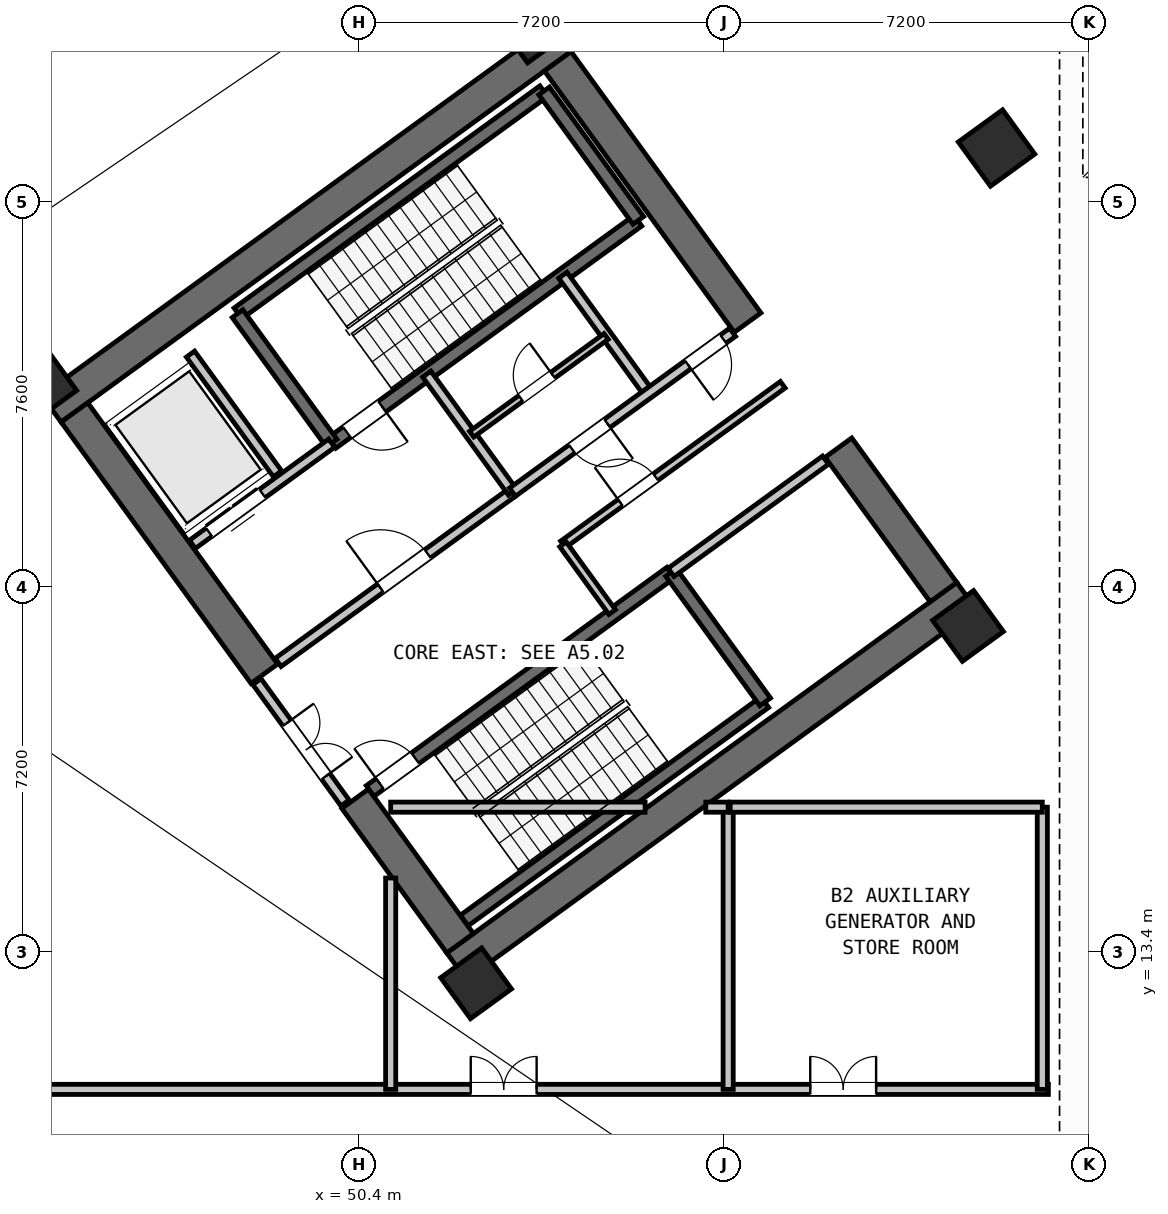
"""IFC4 building model, lengths in metres.
Left out: names, types, materials, properties, quantities, classifications, styles, units other than length and angle.
Written with IfcOpenShell. Run it as: python <this file> out.ifc"""

import sys

from ifc_helpers import new_model, si_unit, direction, frame, frame_2d, origin, origin_2d, place, context, subcontext, project, spatial, rectangle, hollow_rectangle, extrude, source, transform, mapped, element, fill, save


model = new_model("IFC4")
c1 = context("Model", 3, precision=1e-05, world=origin(), true_north=direction((0.0, 1.0)))
c2 = subcontext(c1, "Body", "Model", "MODEL_VIEW")
j1 = project(units=[si_unit("LENGTHUNIT", "METRE"), si_unit("PLANEANGLEUNIT", "RADIAN")], contexts=[c1])
p1 = place(None, origin())
s1 = spatial("IfcSite", under=j1, at=p1, CompositionType="ELEMENT")
p2 = place(p1, origin())
s2 = spatial("IfcBuilding", under=s1, at=p2, CompositionType="ELEMENT")
p3 = place(p2, frame((0.0, 0.0, -9.6)))
s3 = spatial("IfcBuildingStorey", under=s2, at=p3, CompositionType="ELEMENT", Elevation=-9.6)
p4 = place(p3, frame((52.318, 13.11, 0.0), z_axis=(0.0, 0.0, 1.0), x_axis=(0.809019445368, 0.587781878776, 0.0)))
e1 = element("IfcWall", 1, at=p4, inside=s3, PredefinedType="SHEAR", context=c2, shape_type="SweptSolid", body=[
    extrude(rectangle(XDim=12.44, YDim=0.65, at=frame_2d((6.22, 0.0))), origin(), (0.0, 0.0, 1.0), 4.45),
])
p5 = place(p3, frame((44.325, 24.113, 0.0), z_axis=(0.0, 0.0, 1.0), x_axis=(0.809012664862, 0.58779121131, 0.0)))
e2 = element("IfcWall", 2, at=p5, inside=s3, PredefinedType="SHEAR", context=c2, shape_type="SweptSolid", body=[
    extrude(rectangle(XDim=12.44, YDim=0.65, at=frame_2d((6.22, 0.0))), origin(), (0.0, 0.0, 1.0), 4.45),
])
p6 = place(p3, frame((52.39, 13.564, 0.0), z_axis=(0.0, 0.0, 1.0), x_axis=(-0.58779688989, 0.809008539037, 0.0)))
e3 = element("IfcWall", 3, at=p6, inside=s3, PredefinedType="SHEAR", context=c2, shape_type="SweptSolid", body=[
    extrude(rectangle(XDim=3.525, YDim=0.65, at=frame_2d((1.763, 0.0))), origin(), (0.0, 0.0, 1.0), 4.45),
])
p7 = place(p3, frame((48.526, 18.884, 0.0), z_axis=(0.0, 0.0, 1.0), x_axis=(-0.58777996584, 0.809020835181, 0.0)))
e4 = element("IfcWall", 4, at=p7, inside=s3, PredefinedType="SHEAR", context=c2, shape_type="SweptSolid", body=[
    extrude(rectangle(XDim=6.375, YDim=0.65, at=frame_2d((3.188, 0.0))), origin(), (0.0, 0.0, 1.0), 4.45),
])
p8 = place(p3, frame((61.929, 20.494, 0.0), z_axis=(0.0, 0.0, 1.0), x_axis=(-0.58782982593, 0.808984607855, 0.0)))
e5 = element("IfcWall", 5, at=p8, inside=s3, PredefinedType="SHEAR", context=c2, shape_type="SweptSolid", body=[
    extrude(rectangle(XDim=3.525, YDim=0.65, at=frame_2d((1.762, 0.0))), origin(), (0.0, 0.0, 1.0), 4.45),
])
p9 = place(p3, frame((58.064, 25.813, 0.0), z_axis=(0.0, 0.0, 1.0), x_axis=(-0.58777996584, 0.809020835181, 0.0)))
e6 = element("IfcWall", 6, at=p9, inside=s3, PredefinedType="SHEAR", context=c2, shape_type="SweptSolid", body=[
    extrude(rectangle(XDim=6.375, YDim=0.65, at=frame_2d((3.188, 0.0))), origin(), (0.0, 0.0, 1.0), 4.45),
])
m1 = source(origin(), c2, "Body", "SweptSolid", [
    extrude(hollow_rectangle(XDim=1.08, YDim=1.08, WallThickness=0.04, at=origin_2d()), origin(), (0.0, 0.0, 1.0), 4.8),
])
p10 = place(p3, frame((62.977, 29.259, 0.0), z_axis=(0.0, 0.0, 1.0), x_axis=(0.809016994375, 0.587785252292, 0.0)))
e7 = element("IfcColumn", 7, at=p10, inside=s3, PredefinedType="COLUMN", context=c2, shape_type="MappedRepresentation", body=[
    mapped(m1, transform((0.0, 0.0, 0.0), scale=1.0)),
])
m2 = source(origin(), c2, "Body", "SweptSolid", [
    extrude(hollow_rectangle(XDim=1.0, YDim=1.0, WallThickness=0.04, at=origin_2d()), origin(), (0.0, 0.0, 1.0), 4.8),
])
for number, where, z_axis, x_axis in (
    (8, (52.705, 12.773, 0.0), (0.0, 0.0, 1.0), (0.809, 0.588, 0.0)),
    (9, (44.124, 24.585, 0.0), (0.0, 0.0, 1.0), (0.809, 0.588, 0.0)),
    (10, (62.414, 19.827, 0.0), (0.0, 0.0, 1.0), (0.809, 0.588, 0.0)),
    (11, (53.832, 31.638, 0.0), (0.0, 0.0, 1.0), (0.809, 0.588, 0.0)),
):
    element("IfcColumn", number, at=place(p3, frame(where, z_axis=z_axis, x_axis=x_axis)), inside=s3, PredefinedType="COLUMN", context=c2, shape_type="MappedRepresentation", body=[
        mapped(m2, transform((0.0, 0.0, 0.0), scale=1.0)),
    ])
p11 = place(p3, frame((48.006, 25.996, 0.0), z_axis=(0.0, 0.0, 1.0), x_axis=(0.80901903764, 0.587782439969, 0.0)))
e12 = element("IfcWall", 12, at=p11, inside=s3, PredefinedType="SHEAR", context=c2, shape_type="SweptSolid", body=[
    extrude(rectangle(XDim=7.46, YDim=0.26, at=frame_2d((3.73, 0.0))), origin(), (0.0, 0.0, 1.0), 4.45),
])
p12 = place(p3, frame((49.863, 23.44, 0.0), z_axis=(0.0, 0.0, 1.0), x_axis=(0.809003474932, 0.587803859759, 0.0)))
e13 = element("IfcWall", 13, at=p12, inside=s3, PredefinedType="SHEAR", context=c2, shape_type="SweptSolid", body=[
    extrude(rectangle(XDim=7.46, YDim=0.26, at=frame_2d((3.73, 0.0))), origin(), (0.0, 0.0, 1.0), 4.45),
])
p13 = place(p12, frame((0.36, 0.0, 0.0)))
e14 = element("IfcOpeningElement", 14, at=p13, cuts=e13, PredefinedType="OPENING", context=c2, shape_type="SweptSolid", body=[
    extrude(rectangle(XDim=0.86, YDim=2.05, at=frame_2d((0.43, 1.025))), frame((0.0, 0.14, 0.0), z_axis=(0.0, -1.0, 0.0), x_axis=(1.0, 0.0, 0.0)), (0.0, 0.0, 1.0), 0.28),
])
p14 = place(p3, frame((49.855, 23.434, 0.0), z_axis=(0.0, 0.0, 1.0), x_axis=(-0.58776738483, 0.809029975545, 0.0)))
e15 = element("IfcWall", 15, at=p14, inside=s3, PredefinedType="SHEAR", context=c2, shape_type="SweptSolid", body=[
    extrude(rectangle(XDim=3.16, YDim=0.26, at=frame_2d((1.58, 0.0))), origin(), (0.0, 0.0, 1.0), 4.45),
])
p15 = place(p3, frame((55.906, 27.831, 0.0), z_axis=(0.0, 0.0, 1.0), x_axis=(-0.587804123638, 0.809003283204, 0.0)))
e16 = element("IfcWall", 16, at=p15, inside=s3, PredefinedType="SHEAR", context=c2, shape_type="SweptSolid", body=[
    extrude(rectangle(XDim=3.16, YDim=0.26, at=frame_2d((1.58, 0.0))), origin(), (0.0, 0.0, 1.0), 4.45),
])
p16 = place(p3, frame((52.472, 14.013, 0.0), z_axis=(0.0, 0.0, 1.0), x_axis=(0.809028366311, 0.587769599847, 0.0)))
e17 = element("IfcWall", 17, at=p16, inside=s3, PredefinedType="SHEAR", context=c2, shape_type="SweptSolid", body=[
    extrude(rectangle(XDim=7.33, YDim=0.26, at=frame_2d((3.665, 0.0))), origin(), (0.0, 0.0, 1.0), 4.45),
])
p17 = place(p3, frame((50.615, 16.57, 0.0), z_axis=(0.0, 0.0, 1.0), x_axis=(0.809028366311, 0.587769599847, 0.0)))
e18 = element("IfcWall", 18, at=p17, inside=s3, PredefinedType="SHEAR", context=c2, shape_type="SweptSolid", body=[
    extrude(rectangle(XDim=7.33, YDim=0.26, at=frame_2d((3.665, 0.0))), origin(), (0.0, 0.0, 1.0), 4.45),
])
p18 = place(p17, frame((0.24, 0.0, 0.0)))
e19 = element("IfcOpeningElement", 19, at=p18, cuts=e18, PredefinedType="OPENING", context=c2, shape_type="SweptSolid", body=[
    extrude(rectangle(XDim=0.86, YDim=2.05, at=frame_2d((0.43, 1.025))), frame((0.0, 0.14, 0.0), z_axis=(0.0, -1.0, 0.0), x_axis=(1.0, 0.0, 0.0)), (0.0, 0.0, 1.0), 0.28),
])
p19 = place(p3, frame((58.41, 18.327, 0.0), z_axis=(0.0, 0.0, 1.0), x_axis=(-0.58776738483, 0.809029975545, 0.0)))
e20 = element("IfcWall", 20, at=p19, inside=s3, PredefinedType="SHEAR", context=c2, shape_type="SweptSolid", body=[
    extrude(rectangle(XDim=3.16, YDim=0.26, at=frame_2d((1.58, 0.0))), origin(), (0.0, 0.0, 1.0), 4.45),
])
p20 = place(p3, frame((47.106, 21.437, 0.0), z_axis=(0.0, 0.0, 1.0), x_axis=(0.809012514015, 0.58779141893, 0.0)))
e21 = element("IfcWall", 21, at=p20, inside=s3, PredefinedType="STANDARD", context=c2, shape_type="SweptSolid", body=[
    extrude(rectangle(XDim=3.398, YDim=0.2, at=frame_2d((1.699, 0.0))), origin(), (0.0, 0.0, 1.0), 4.44),
])
p21 = place(p20, frame((0.408, 0.0, 0.0)))
e22 = element("IfcOpeningElement", 22, at=p21, cuts=e21, PredefinedType="OPENING", context=c2, shape_type="SweptSolid", body=[
    extrude(rectangle(XDim=1.3, YDim=2.2, at=frame_2d((0.65, 1.1))), frame((0.0, 0.11, 0.0), z_axis=(0.0, -1.0, 0.0), x_axis=(1.0, 0.0, 0.0)), (0.0, 0.0, 1.0), 0.22),
])
p22 = place(p3, frame((48.799, 19.107, 0.0), z_axis=(0.0, 0.0, 1.0), x_axis=(0.809012959416, 0.587790805897, 0.0)))
e23 = element("IfcWall", 23, at=p22, inside=s3, PredefinedType="STANDARD", context=c2, shape_type="SweptSolid", body=[
    extrude(rectangle(XDim=5.718, YDim=0.2, at=frame_2d((2.859, 0.0))), origin(), (0.0, 0.0, 1.0), 4.44),
])
p23 = place(p22, frame((2.498, 0.0, 0.0)))
e24 = element("IfcOpeningElement", 24, at=p23, cuts=e23, PredefinedType="OPENING", context=c2, shape_type="SweptSolid", body=[
    extrude(rectangle(XDim=1.15, YDim=2.1, at=frame_2d((0.575, 1.05))), frame((0.0, 0.11, 0.0), z_axis=(0.0, -1.0, 0.0), x_axis=(1.0, 0.0, 0.0)), (0.0, 0.0, 1.0), 0.22),
])
p24 = place(p3, frame((56.553, 20.884, 0.0), z_axis=(0.0, 0.0, 1.0), x_axis=(0.809035789462, 0.587759382205, 0.0)))
e25 = element("IfcWall", 25, at=p24, inside=s3, PredefinedType="STANDARD", context=c2, shape_type="SweptSolid", body=[
    extrude(rectangle(XDim=3.768, YDim=0.2, at=frame_2d((1.884, 0.0))), origin(), (0.0, 0.0, 1.0), 4.44),
])
p25 = place(p3, frame((54.421, 21.436, 0.0), z_axis=(0.0, 0.0, 1.0), x_axis=(0.809013710463, 0.587789772183, 0.0)))
e26 = element("IfcWall", 26, at=p25, inside=s3, PredefinedType="PARTITIONING", context=c2, shape_type="SweptSolid", body=[
    extrude(rectangle(XDim=5.36, YDim=0.16, at=frame_2d((2.68, 0.0))), origin(), (0.0, 0.0, 1.0), 4.44),
])
p26 = place(p25, frame((1.4, 0.0, 0.0)))
e27 = element("IfcOpeningElement", 27, at=p26, cuts=e26, PredefinedType="OPENING", context=c2, shape_type="SweptSolid", body=[
    extrude(rectangle(XDim=0.86, YDim=2.05, at=frame_2d((0.43, 1.025))), frame((0.0, 0.09, 0.0), z_axis=(0.0, -1.0, 0.0), x_axis=(1.0, 0.0, 0.0)), (0.0, 0.0, 1.0), 0.18),
])
p27 = place(p3, frame((55.391, 20.102, 0.0), z_axis=(0.0, 0.0, 1.0), x_axis=(-0.58778447739, 0.809017557374, 0.0)))
e28 = element("IfcWall", 28, at=p27, inside=s3, PredefinedType="PARTITIONING", context=c2, shape_type="SweptSolid", body=[
    extrude(rectangle(XDim=1.65, YDim=0.16, at=frame_2d((0.825, 0.0))), origin(), (0.0, 0.0, 1.0), 4.44),
])
p28 = place(p3, frame((48.786, 22.83, 0.0), z_axis=(0.0, 0.0, 1.0), x_axis=(-0.587783856777, 0.809018008275, 0.0)))
e29 = element("IfcWall", 29, at=p28, inside=s3, PredefinedType="STANDARD", context=c2, shape_type="SweptSolid", body=[
    extrude(rectangle(XDim=2.92, YDim=0.2, at=frame_2d((1.46, 0.0))), origin(), (0.0, 0.0, 1.0), 4.44),
])
p29 = place(p3, frame((53.425, 22.468, 0.0), z_axis=(0.0, 0.0, 1.0), x_axis=(-0.5877230039, 0.809062216821, 0.0)))
e30 = element("IfcWall", 30, at=p29, inside=s3, PredefinedType="STANDARD", context=c2, shape_type="SweptSolid", body=[
    extrude(rectangle(XDim=2.88, YDim=0.2, at=frame_2d((1.44, 0.0))), origin(), (0.0, 0.0, 1.0), 4.44),
])
p30 = place(p3, frame((56.111, 24.419, 0.0), z_axis=(0.0, 0.0, 1.0), x_axis=(-0.58777848983, 0.809021907548, 0.0)))
e31 = element("IfcWall", 31, at=p30, inside=s3, PredefinedType="STANDARD", context=c2, shape_type="SweptSolid", body=[
    extrude(rectangle(XDim=2.88, YDim=0.2, at=frame_2d((1.44, 0.0))), origin(), (0.0, 0.0, 1.0), 4.44),
])
p31 = place(p3, frame((53.425, 22.468, 0.0), z_axis=(0.0, 0.0, 1.0), x_axis=(0.80902705128, 0.587771409902, 0.0)))
e32 = element("IfcWall", 32, at=p31, inside=s3, PredefinedType="STANDARD", context=c2, shape_type="SweptSolid", body=[
    extrude(rectangle(XDim=5.368, YDim=0.2, at=frame_2d((2.684, 0.0))), origin(), (0.0, 0.0, 1.0), 4.44),
])
p32 = place(p31, frame((4.28, 0.0, 0.0)))
e33 = element("IfcOpeningElement", 33, at=p32, cuts=e32, PredefinedType="OPENING", context=c2, shape_type="SweptSolid", body=[
    extrude(rectangle(XDim=0.86, YDim=2.05, at=frame_2d((0.43, 1.025))), frame((0.0, 0.11, 0.0), z_axis=(0.0, -1.0, 0.0), x_axis=(1.0, 0.0, 0.0)), (0.0, 0.0, 1.0), 0.22),
])
p33 = place(p31, frame((1.45, 0.0, 0.0)))
e34 = element("IfcOpeningElement", 34, at=p33, cuts=e32, PredefinedType="OPENING", context=c2, shape_type="SweptSolid", body=[
    extrude(rectangle(XDim=0.86, YDim=2.05, at=frame_2d((0.43, 1.025))), frame((0.0, 0.11, 0.0), z_axis=(0.0, -1.0, 0.0), x_axis=(1.0, 0.0, 0.0)), (0.0, 0.0, 1.0), 0.22),
])
p34 = place(p3, frame((52.618, 23.612, 0.0), z_axis=(0.0, 0.0, 1.0), x_axis=(0.809009587469, 0.587795446889, 0.0)))
e35 = element("IfcWall", 35, at=p34, inside=s3, PredefinedType="PLUMBINGWALL", context=c2, shape_type="SweptSolid", body=[
    extrude(rectangle(XDim=3.28, YDim=0.14, at=frame_2d((1.64, 0.0))), origin(), (0.0, 0.0, 1.0), 4.44),
])
p35 = place(p34, frame((1.2, 0.0, 0.0)))
e36 = element("IfcOpeningElement", 36, at=p35, cuts=e35, PredefinedType="OPENING", context=c2, shape_type="SweptSolid", body=[
    extrude(rectangle(XDim=0.78, YDim=2.05, at=frame_2d((0.39, 1.025))), frame((0.0, 0.08, 0.0), z_axis=(0.0, -1.0, 0.0), x_axis=(1.0, 0.0, 0.0)), (0.0, 0.0, 1.0), 0.16),
])
p36 = place(p3, frame((8.8, 10.68, 0.0), z_axis=(0.0, 0.0, 1.0), x_axis=(1.0, 0.0, 0.0)))
e37 = element("IfcWall", 37, at=p36, inside=s3, PredefinedType="STANDARD", context=c2, shape_type="SweptSolid", body=[
    extrude(rectangle(XDim=55.2, YDim=0.2, at=frame_2d((27.6, 0.0))), origin(), (0.0, 0.0, 1.0), 4.44),
])
p37 = place(p36, frame((25.0, 0.0, 0.0)))
e38 = element("IfcOpeningElement", 38, at=p37, cuts=e37, PredefinedType="OPENING", context=c2, shape_type="SweptSolid", body=[
    extrude(rectangle(XDim=1.3, YDim=2.15, at=frame_2d((0.65, 1.075))), frame((0.0, 0.11, 0.0), z_axis=(0.0, -1.0, 0.0), x_axis=(1.0, 0.0, 0.0)), (0.0, 0.0, 1.0), 0.22),
])
p38 = place(p36, frame((1.7, 0.0, 0.0)))
e39 = element("IfcOpeningElement", 39, at=p38, cuts=e37, PredefinedType="OPENING", context=c2, shape_type="SweptSolid", body=[
    extrude(rectangle(XDim=1.3, YDim=2.15, at=frame_2d((0.65, 1.075))), frame((0.0, 0.11, 0.0), z_axis=(0.0, -1.0, 0.0), x_axis=(1.0, 0.0, 0.0)), (0.0, 0.0, 1.0), 0.22),
])
p39 = place(p36, frame((12.5, 0.0, 0.0)))
e40 = element("IfcOpeningElement", 40, at=p39, cuts=e37, PredefinedType="OPENING", context=c2, shape_type="SweptSolid", body=[
    extrude(rectangle(XDim=1.3, YDim=2.15, at=frame_2d((0.65, 1.075))), frame((0.0, 0.11, 0.0), z_axis=(0.0, -1.0, 0.0), x_axis=(1.0, 0.0, 0.0)), (0.0, 0.0, 1.0), 0.22),
])
p40 = place(p36, frame((43.8, 0.0, 0.0)))
e41 = element("IfcOpeningElement", 41, at=p40, cuts=e37, PredefinedType="OPENING", context=c2, shape_type="SweptSolid", body=[
    extrude(rectangle(XDim=1.3, YDim=2.15, at=frame_2d((0.65, 1.075))), frame((0.0, 0.11, 0.0), z_axis=(0.0, -1.0, 0.0), x_axis=(1.0, 0.0, 0.0)), (0.0, 0.0, 1.0), 0.22),
])
p41 = place(p36, frame((50.5, 0.0, 0.0)))
e42 = element("IfcOpeningElement", 42, at=p41, cuts=e37, PredefinedType="OPENING", context=c2, shape_type="SweptSolid", body=[
    extrude(rectangle(XDim=1.3, YDim=2.15, at=frame_2d((0.65, 1.075))), frame((0.0, 0.11, 0.0), z_axis=(0.0, -1.0, 0.0), x_axis=(1.0, 0.0, 0.0)), (0.0, 0.0, 1.0), 0.22),
])
p42 = place(p3, frame((50.119, 16.333, 0.0), z_axis=(0.0, 0.0, 1.0), x_axis=(-0.587749856981, 0.809042709391, 0.0)))
e43 = element("IfcWall", 43, at=p42, inside=s3, PredefinedType="STANDARD", context=c2, shape_type="SweptSolid", body=[
    extrude(rectangle(XDim=2.96, YDim=0.2, at=frame_2d((1.48, 0.0))), origin(), (0.0, 0.0, 1.0), 4.44),
])
p43 = place(p42, frame((0.65, 0.0, 0.0)))
e44 = element("IfcOpeningElement", 44, at=p43, cuts=e43, PredefinedType="OPENING", context=c2, shape_type="SweptSolid", body=[
    extrude(rectangle(XDim=1.3, YDim=2.15, at=frame_2d((0.65, 1.075))), frame((0.0, 0.11, 0.0), z_axis=(0.0, -1.0, 0.0), x_axis=(1.0, 0.0, 0.0)), (0.0, 0.0, 1.0), 0.22),
])
p44 = place(p3, frame((51.02, 10.68, 0.0), z_axis=(0.0, 0.0, 1.0), x_axis=(0.0, 1.0, 0.0)))
e45 = element("IfcWall", 45, at=p44, inside=s3, PredefinedType="STANDARD", context=c2, shape_type="SweptSolid", body=[
    extrude(rectangle(XDim=4.172, YDim=0.2, at=frame_2d((2.086, 0.0))), origin(), (0.0, 0.0, 1.0), 4.44),
])
p45 = place(p3, frame((57.68, 10.68, 0.0), z_axis=(0.0, 0.0, 1.0), x_axis=(0.0, 1.0, 0.0)))
e46 = element("IfcWall", 46, at=p45, inside=s3, PredefinedType="STANDARD", context=c2, shape_type="SweptSolid", body=[
    extrude(rectangle(XDim=5.57, YDim=0.2, at=frame_2d((2.785, 0.0))), origin(), (0.0, 0.0, 1.0), 4.44),
])
p46 = place(p3, frame((51.02, 16.25, 0.0), z_axis=(0.0, 0.0, 1.0), x_axis=(1.0, 0.0, 0.0)))
e47 = element("IfcWall", 47, at=p46, inside=s3, PredefinedType="STANDARD", context=c2, shape_type="SweptSolid", body=[
    extrude(rectangle(XDim=5.021, YDim=0.2, at=frame_2d((2.51, 0.0))), origin(), (0.0, 0.0, 1.0), 4.44),
])
p47 = place(p3, frame((57.239, 16.25, 0.0), z_axis=(0.0, 0.0, 1.0), x_axis=(1.0, 0.0, 0.0)))
e48 = element("IfcWall", 48, at=p47, inside=s3, PredefinedType="STANDARD", context=c2, shape_type="SweptSolid", body=[
    extrude(rectangle(XDim=0.441, YDim=0.2, at=frame_2d((0.221, 0.0))), origin(), (0.0, 0.0, 1.0), 4.44),
])
p48 = place(p3, frame((63.88, 10.68, 0.0), z_axis=(0.0, 0.0, 1.0), x_axis=(0.0, 1.0, 0.0)))
e49 = element("IfcWall", 49, at=p48, inside=s3, PredefinedType="STANDARD", context=c2, shape_type="SweptSolid", body=[
    extrude(rectangle(XDim=5.57, YDim=0.2, at=frame_2d((2.785, 0.0))), origin(), (0.0, 0.0, 1.0), 4.44),
])
p49 = place(p3, frame((57.72, 16.25, 0.0), z_axis=(0.0, 0.0, 1.0), x_axis=(1.0, 0.0, 0.0)))
e50 = element("IfcWall", 50, at=p49, inside=s3, PredefinedType="STANDARD", context=c2, shape_type="SweptSolid", body=[
    extrude(rectangle(XDim=6.16, YDim=0.2, at=frame_2d((3.08, 0.0))), origin(), (0.0, 0.0, 1.0), 4.44),
])
m3 = source(origin(), c2, "Body", "SweptSolid", [
    extrude(rectangle(XDim=0.86, YDim=2.05, at=frame_2d((0.43, 1.025))), frame((0.0, 0.025, 0.0), z_axis=(0.0, -1.0, 0.0), x_axis=(1.0, 0.0, 0.0)), (0.0, 0.0, 1.0), 0.05),
])
p50 = place(p13, frame((0.86, 0.0, 0.0), z_axis=(0.0, 0.0, 1.0), x_axis=(-1.0, 0.0, 0.0)))
e51 = element("IfcDoor", 51, at=p50, inside=s3, OperationType="SINGLE_SWING_LEFT", PredefinedType="DOOR", context=c2, shape_type="MappedRepresentation", body=[
    mapped(m3, transform((0.0, 0.0, 0.0), scale=1.0)),
])
fill(e14, e51)
p51 = place(p26, origin())
e52 = element("IfcDoor", 52, at=p51, inside=s3, OperationType="SINGLE_SWING_LEFT", PredefinedType="DOOR", context=c2, shape_type="MappedRepresentation", body=[
    mapped(m3, transform((0.0, 0.0, 0.0), scale=1.0)),
])
fill(e27, e52)
p52 = place(p18, origin())
e53 = element("IfcDoor", 53, at=p52, inside=s3, OperationType="SINGLE_SWING_LEFT", PredefinedType="DOOR", context=c2, shape_type="MappedRepresentation", body=[
    mapped(m3, transform((0.0, 0.0, 0.0), scale=1.0)),
])
fill(e19, e53)
m4 = source(origin(), c2, "Body", "SweptSolid", [
    extrude(rectangle(XDim=1.15, YDim=2.1, at=frame_2d((0.575, 1.05))), frame((0.0, 0.025, 0.0), z_axis=(0.0, -1.0, 0.0), x_axis=(1.0, 0.0, 0.0)), (0.0, 0.0, 1.0), 0.05),
])
p53 = place(p23, origin())
e54 = element("IfcDoor", 54, at=p53, inside=s3, OperationType="SINGLE_SWING_LEFT", PredefinedType="DOOR", context=c2, shape_type="MappedRepresentation", body=[
    mapped(m4, transform((0.0, 0.0, 0.0), scale=1.0)),
])
fill(e24, e54)
m5 = source(origin(), c2, "Body", "SweptSolid", [
    extrude(rectangle(XDim=1.3, YDim=2.2, at=frame_2d((0.65, 1.1))), frame((0.0, 0.025, 0.0), z_axis=(0.0, -1.0, 0.0), x_axis=(1.0, 0.0, 0.0)), (0.0, 0.0, 1.0), 0.05),
])
p54 = place(p21, origin())
e55 = element("IfcDoor", 55, at=p54, inside=s3, OperationType="DOUBLE_DOOR_SLIDING", PredefinedType="DOOR", context=c2, shape_type="MappedRepresentation", body=[
    mapped(m5, transform((0.0, 0.0, 0.0), scale=1.0)),
])
fill(e22, e55)
p55 = place(p32, frame((0.86, 0.0, 0.0), z_axis=(0.0, 0.0, 1.0), x_axis=(-1.0, 0.0, 0.0)))
e56 = element("IfcDoor", 56, at=p55, inside=s3, OperationType="SINGLE_SWING_RIGHT", PredefinedType="DOOR", context=c2, shape_type="MappedRepresentation", body=[
    mapped(m3, transform((0.0, 0.0, 0.0), scale=1.0)),
])
fill(e33, e56)
p56 = place(p33, frame((0.86, 0.0, 0.0), z_axis=(0.0, 0.0, 1.0), x_axis=(-1.0, 0.0, 0.0)))
e57 = element("IfcDoor", 57, at=p56, inside=s3, OperationType="SINGLE_SWING_LEFT", PredefinedType="DOOR", context=c2, shape_type="MappedRepresentation", body=[
    mapped(m3, transform((0.0, 0.0, 0.0), scale=1.0)),
])
fill(e34, e57)
m6 = source(origin(), c2, "Body", "SweptSolid", [
    extrude(rectangle(XDim=0.78, YDim=2.05, at=frame_2d((0.39, 1.025))), frame((0.0, 0.025, 0.0), z_axis=(0.0, -1.0, 0.0), x_axis=(1.0, 0.0, 0.0)), (0.0, 0.0, 1.0), 0.05),
])
p57 = place(p35, origin())
e58 = element("IfcDoor", 58, at=p57, inside=s3, OperationType="SINGLE_SWING_RIGHT", PredefinedType="DOOR", context=c2, shape_type="MappedRepresentation", body=[
    mapped(m6, transform((0.0, 0.0, 0.0), scale=1.0)),
])
fill(e36, e58)
m7 = source(origin(), c2, "Body", "SweptSolid", [
    extrude(rectangle(XDim=1.3, YDim=2.15, at=frame_2d((0.65, 1.075))), frame((0.0, 0.025, 0.0), z_axis=(0.0, -1.0, 0.0), x_axis=(1.0, 0.0, 0.0)), (0.0, 0.0, 1.0), 0.05),
])
p58 = place(p43, frame((1.3, 0.0, 0.0), z_axis=(0.0, 0.0, 1.0), x_axis=(-1.0, 0.0, 0.0)))
e59 = element("IfcDoor", 59, at=p58, inside=s3, OperationType="DOUBLE_DOOR_SINGLE_SWING", PredefinedType="DOOR", context=c2, shape_type="MappedRepresentation", body=[
    mapped(m7, transform((0.0, 0.0, 0.0), scale=1.0)),
])
fill(e44, e59)
p59 = place(p40, origin())
e60 = element("IfcDoor", 60, at=p59, inside=s3, OperationType="DOUBLE_DOOR_SINGLE_SWING", PredefinedType="DOOR", context=c2, shape_type="MappedRepresentation", body=[
    mapped(m7, transform((0.0, 0.0, 0.0), scale=1.0)),
])
fill(e41, e60)
p60 = place(p41, origin())
e61 = element("IfcDoor", 61, at=p60, inside=s3, OperationType="DOUBLE_DOOR_SINGLE_SWING", PredefinedType="DOOR", context=c2, shape_type="MappedRepresentation", body=[
    mapped(m7, transform((0.0, 0.0, 0.0), scale=1.0)),
])
fill(e42, e61)
save(model, sys.argv[1])
